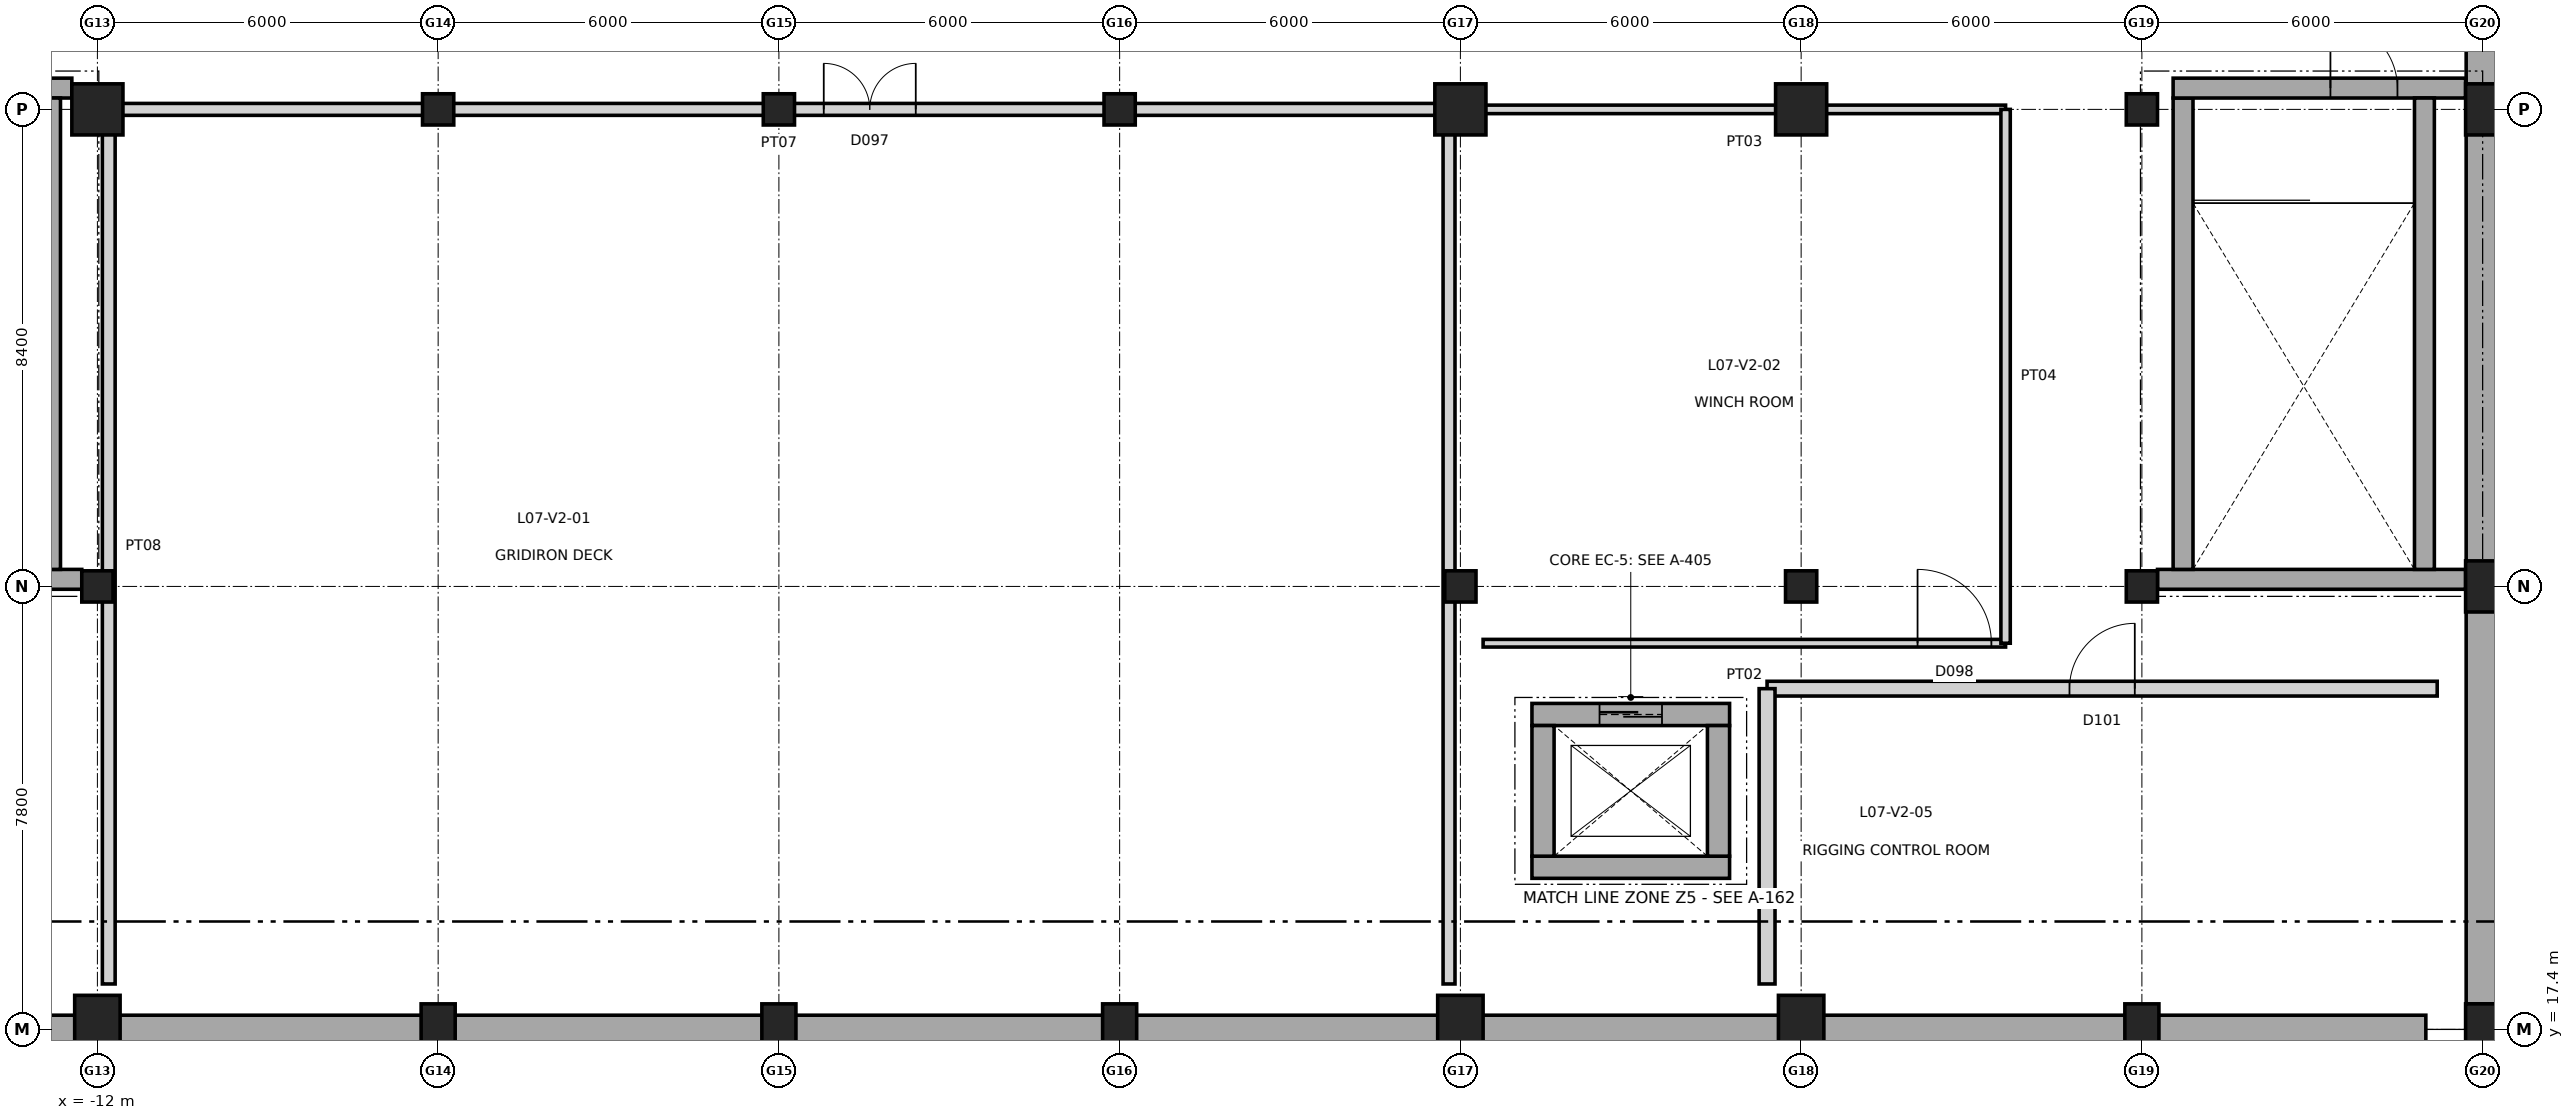
"""IFC4 building model, lengths in metres.
Left out: names, types, materials, properties, quantities, classifications, styles, units other than length and angle.
Written with IfcOpenShell. Run it as: python <this file> out.ifc"""

import sys

from ifc_helpers import new_model, si_unit, direction, frame, frame_2d, origin, origin_2d, place, context, subcontext, project, spatial, rectangle, extrude, element, fill, save


model = new_model("IFC4")
c1 = context("Model", 3, precision=1e-05, world=origin(), true_north=direction((0.0, 1.0)))
c2 = subcontext(c1, "Body", "Model", "MODEL_VIEW")
j1 = project(units=[si_unit("LENGTHUNIT", "METRE"), si_unit("PLANEANGLEUNIT", "RADIAN")], contexts=[c1])
p1 = place(None, origin())
s1 = spatial("IfcSite", under=j1, at=p1, CompositionType="ELEMENT")
p2 = place(p1, origin())
s2 = spatial("IfcBuilding", under=s1, at=p2, CompositionType="ELEMENT")
p3 = place(p2, frame((0.0, 0.0, 36.0)))
s3 = spatial("IfcBuildingStorey", under=s2, at=p3, CompositionType="ELEMENT", Elevation=36.0)
p4 = place(p3, frame((-12.0, 17.4, 0.0), z_axis=(0.0, 0.0, 1.0), x_axis=(1.0, 0.0, 0.0)))
e1 = element("IfcColumn", 1, at=p4, inside=s3, PredefinedType="COLUMN", context=c2, shape_type="SweptSolid", body=[
    extrude(rectangle(XDim=0.8, YDim=1.2, at=origin_2d()), origin(), (0.0, 0.0, 1.0), 5.4),
])
p5 = place(p3, frame((-12.0, 25.2, 0.0), z_axis=(0.0, 0.0, 1.0), x_axis=(1.0, 0.0, 0.0)))
e2 = element("IfcColumn", 2, at=p5, inside=s3, PredefinedType="COLUMN", context=c2, shape_type="SweptSolid", body=[
    extrude(rectangle(XDim=0.55, YDim=0.55, at=origin_2d()), origin(), (0.0, 0.0, 1.0), 5.4),
])
p6 = place(p3, frame((-12.0, 33.6, 0.0), z_axis=(0.0, 0.0, 1.0), x_axis=(1.0, 0.0, 0.0)))
e3 = element("IfcColumn", 3, at=p6, inside=s3, PredefinedType="COLUMN", context=c2, shape_type="SweptSolid", body=[
    extrude(rectangle(XDim=0.9, YDim=0.9, at=origin_2d()), origin(), (0.0, 0.0, 1.0), 5.4),
])
p7 = place(p3, frame((-6.0, 17.4, 0.0), z_axis=(0.0, 0.0, 1.0), x_axis=(1.0, 0.0, 0.0)))
e4 = element("IfcColumn", 4, at=p7, inside=s3, PredefinedType="COLUMN", context=c2, shape_type="SweptSolid", body=[
    extrude(rectangle(XDim=0.6, YDim=0.9, at=origin_2d()), origin(), (0.0, 0.0, 1.0), 5.4),
])
p8 = place(p3, frame((-6.0, 33.6, 0.0), z_axis=(0.0, 0.0, 1.0), x_axis=(1.0, 0.0, 0.0)))
e5 = element("IfcColumn", 5, at=p8, inside=s3, PredefinedType="COLUMN", context=c2, shape_type="SweptSolid", body=[
    extrude(rectangle(XDim=0.55, YDim=0.55, at=origin_2d()), origin(), (0.0, 0.0, 1.0), 5.4),
])
p9 = place(p3, frame((0.0, 17.4, 0.0), z_axis=(0.0, 0.0, 1.0), x_axis=(1.0, 0.0, 0.0)))
e6 = element("IfcColumn", 6, at=p9, inside=s3, PredefinedType="COLUMN", context=c2, shape_type="SweptSolid", body=[
    extrude(rectangle(XDim=0.6, YDim=0.9, at=origin_2d()), origin(), (0.0, 0.0, 1.0), 5.4),
])
p10 = place(p3, frame((0.0, 33.6, 0.0), z_axis=(0.0, 0.0, 1.0), x_axis=(1.0, 0.0, 0.0)))
e7 = element("IfcColumn", 7, at=p10, inside=s3, PredefinedType="COLUMN", context=c2, shape_type="SweptSolid", body=[
    extrude(rectangle(XDim=0.55, YDim=0.55, at=origin_2d()), origin(), (0.0, 0.0, 1.0), 5.4),
])
p11 = place(p3, frame((6.0, 17.4, 0.0), z_axis=(0.0, 0.0, 1.0), x_axis=(1.0, 0.0, 0.0)))
e8 = element("IfcColumn", 8, at=p11, inside=s3, PredefinedType="COLUMN", context=c2, shape_type="SweptSolid", body=[
    extrude(rectangle(XDim=0.6, YDim=0.9, at=origin_2d()), origin(), (0.0, 0.0, 1.0), 5.4),
])
p12 = place(p3, frame((6.0, 33.6, 0.0), z_axis=(0.0, 0.0, 1.0), x_axis=(1.0, 0.0, 0.0)))
e9 = element("IfcColumn", 9, at=p12, inside=s3, PredefinedType="COLUMN", context=c2, shape_type="SweptSolid", body=[
    extrude(rectangle(XDim=0.55, YDim=0.55, at=origin_2d()), origin(), (0.0, 0.0, 1.0), 5.4),
])
p13 = place(p3, frame((12.0, 17.4, 0.0), z_axis=(0.0, 0.0, 1.0), x_axis=(1.0, 0.0, 0.0)))
e10 = element("IfcColumn", 10, at=p13, inside=s3, PredefinedType="COLUMN", context=c2, shape_type="SweptSolid", body=[
    extrude(rectangle(XDim=0.8, YDim=1.2, at=origin_2d()), origin(), (0.0, 0.0, 1.0), 5.4),
])
p14 = place(p3, frame((12.0, 25.2, 0.0), z_axis=(0.0, 0.0, 1.0), x_axis=(1.0, 0.0, 0.0)))
e11 = element("IfcColumn", 11, at=p14, inside=s3, PredefinedType="COLUMN", context=c2, shape_type="SweptSolid", body=[
    extrude(rectangle(XDim=0.55, YDim=0.55, at=origin_2d()), origin(), (0.0, 0.0, 1.0), 5.4),
])
p15 = place(p3, frame((12.0, 33.6, 0.0), z_axis=(0.0, 0.0, 1.0), x_axis=(1.0, 0.0, 0.0)))
e12 = element("IfcColumn", 12, at=p15, inside=s3, PredefinedType="COLUMN", context=c2, shape_type="SweptSolid", body=[
    extrude(rectangle(XDim=0.9, YDim=0.9, at=origin_2d()), origin(), (0.0, 0.0, 1.0), 5.4),
])
p16 = place(p3, frame((18.0, 17.4, 0.0), z_axis=(0.0, 0.0, 1.0), x_axis=(1.0, 0.0, 0.0)))
e13 = element("IfcColumn", 13, at=p16, inside=s3, PredefinedType="COLUMN", context=c2, shape_type="SweptSolid", body=[
    extrude(rectangle(XDim=0.8, YDim=1.2, at=origin_2d()), origin(), (0.0, 0.0, 1.0), 5.4),
])
p17 = place(p3, frame((18.0, 25.2, 0.0), z_axis=(0.0, 0.0, 1.0), x_axis=(1.0, 0.0, 0.0)))
e14 = element("IfcColumn", 14, at=p17, inside=s3, PredefinedType="COLUMN", context=c2, shape_type="SweptSolid", body=[
    extrude(rectangle(XDim=0.55, YDim=0.55, at=origin_2d()), origin(), (0.0, 0.0, 1.0), 5.4),
])
p18 = place(p3, frame((18.0, 33.6, 0.0), z_axis=(0.0, 0.0, 1.0), x_axis=(1.0, 0.0, 0.0)))
e15 = element("IfcColumn", 15, at=p18, inside=s3, PredefinedType="COLUMN", context=c2, shape_type="SweptSolid", body=[
    extrude(rectangle(XDim=0.9, YDim=0.9, at=origin_2d()), origin(), (0.0, 0.0, 1.0), 5.4),
])
p19 = place(p3, frame((24.0, 17.4, 0.0), z_axis=(0.0, 0.0, 1.0), x_axis=(1.0, 0.0, 0.0)))
e16 = element("IfcColumn", 16, at=p19, inside=s3, PredefinedType="COLUMN", context=c2, shape_type="SweptSolid", body=[
    extrude(rectangle(XDim=0.6, YDim=0.9, at=origin_2d()), origin(), (0.0, 0.0, 1.0), 5.4),
])
for number, where, z_axis, x_axis in (
    (17, (24.0, 25.2, 0.0), (0.0, 0.0, 1.0), (1.0, 0.0, 0.0)),
    (18, (24.0, 33.6, 0.0), (0.0, 0.0, 1.0), (1.0, 0.0, 0.0)),
):
    element("IfcColumn", number, at=place(p3, frame(where, z_axis=z_axis, x_axis=x_axis)), inside=s3, PredefinedType="COLUMN", context=c2, shape_type="SweptSolid", body=[
        extrude(rectangle(XDim=0.55, YDim=0.55, at=origin_2d()), origin(), (0.0, 0.0, 1.0), 5.4),
    ])
for number, where, z_axis, x_axis in (
    (19, (30.0, 17.4, 0.0), (0.0, 0.0, 1.0), (1.0, 0.0, 0.0)),
    (20, (30.0, 25.2, 0.0), (0.0, 0.0, 1.0), (1.0, 0.0, 0.0)),
    (21, (30.0, 33.6, 0.0), (0.0, 0.0, 1.0), (1.0, 0.0, 0.0)),
):
    element("IfcColumn", number, at=place(p3, frame(where, z_axis=z_axis, x_axis=x_axis)), inside=s3, PredefinedType="COLUMN", context=c2, shape_type="SweptSolid", body=[
        extrude(rectangle(XDim=0.6, YDim=0.9, at=origin_2d()), origin(), (0.0, 0.0, 1.0), 5.4),
    ])
p20 = place(p3, frame((30.0, 17.85, 0.0), z_axis=(0.0, 0.0, 1.0), x_axis=(0.0, 1.0, 0.0)))
e22 = element("IfcWall", 22, at=p20, inside=s3, PredefinedType="SHEAR", context=c2, shape_type="SweptSolid", body=[
    extrude(rectangle(XDim=23.7, YDim=0.58, at=frame_2d((11.85, 0.0))), origin(), (0.0, 0.0, 1.0), 5.4),
])
p21 = place(p3, frame((-17.0, 17.4, 0.0), z_axis=(0.0, 0.0, 1.0), x_axis=(1.0, 0.0, 0.0)))
e23 = element("IfcWall", 23, at=p21, inside=s3, PredefinedType="SHEAR", context=c2, shape_type="SweptSolid", body=[
    extrude(rectangle(XDim=46.0, YDim=0.5, at=frame_2d((23.0, 0.0))), origin(), (0.0, 0.0, 1.0), 5.4),
])
p22 = place(p3, frame((-12.275, 25.325, 0.0), z_axis=(0.0, 0.0, 1.0), x_axis=(-1.0, 0.0, 0.0)))
e24 = element("IfcWall", 24, at=p22, inside=s3, PredefinedType="SHEAR", context=c2, shape_type="SweptSolid", body=[
    extrude(rectangle(XDim=5.425, YDim=0.35, at=frame_2d((2.712, 0.0))), origin(), (0.0, 0.0, 1.0), 4.645),
])
p23 = place(p3, frame((-17.6, 33.975, 0.0), z_axis=(0.0, 0.0, 1.0), x_axis=(1.0, 0.0, 0.0)))
e25 = element("IfcWall", 25, at=p23, inside=s3, PredefinedType="SHEAR", context=c2, shape_type="SweptSolid", body=[
    extrude(rectangle(XDim=5.15, YDim=0.35, at=frame_2d((2.575, 0.0))), origin(), (0.0, 0.0, 1.0), 4.645),
])
p24 = place(p23, frame((3.12, 0.0, 0.0)))
e26 = element("IfcOpeningElement", 26, at=p24, cuts=e25, PredefinedType="OPENING", context=c2, shape_type="SweptSolid", body=[
    extrude(rectangle(XDim=1.18, YDim=2.15, at=frame_2d((0.59, 1.075))), frame((0.0, 0.185, 0.0), z_axis=(0.0, -1.0, 0.0), x_axis=(1.0, 0.0, 0.0)), (0.0, 0.0, 1.0), 0.37),
])
p25 = place(p3, frame((-12.825, 33.8, 0.0), z_axis=(0.0, 0.0, 1.0), x_axis=(0.0, -1.0, 0.0)))
e27 = element("IfcWall", 27, at=p25, inside=s3, PredefinedType="SHEAR", context=c2, shape_type="SweptSolid", body=[
    extrude(rectangle(XDim=8.3, YDim=0.35, at=frame_2d((4.15, 0.0))), origin(), (0.0, 0.0, 1.0), 4.645),
])
p26 = place(p3, frame((29.7, 25.325, 0.0), z_axis=(0.0, 0.0, 1.0), x_axis=(-1.0, 0.0, 0.0)))
e28 = element("IfcWall", 28, at=p26, inside=s3, PredefinedType="SHEAR", context=c2, shape_type="SweptSolid", body=[
    extrude(rectangle(XDim=5.425, YDim=0.35, at=frame_2d((2.712, 0.0))), origin(), (0.0, 0.0, 1.0), 4.645),
])
p27 = place(p3, frame((24.725, 25.5, 0.0), z_axis=(0.0, 0.0, 1.0), x_axis=(0.0, 1.0, 0.0)))
e29 = element("IfcWall", 29, at=p27, inside=s3, PredefinedType="SHEAR", context=c2, shape_type="SweptSolid", body=[
    extrude(rectangle(XDim=8.3, YDim=0.35, at=frame_2d((4.15, 0.0))), origin(), (0.0, 0.0, 1.0), 4.645),
])
p28 = place(p3, frame((24.55, 33.975, 0.0), z_axis=(0.0, 0.0, 1.0), x_axis=(1.0, 0.0, 0.0)))
e30 = element("IfcWall", 30, at=p28, inside=s3, PredefinedType="SHEAR", context=c2, shape_type="SweptSolid", body=[
    extrude(rectangle(XDim=5.15, YDim=0.35, at=frame_2d((2.575, 0.0))), origin(), (0.0, 0.0, 1.0), 4.645),
])
p29 = place(p28, frame((2.77, 0.0, 0.0)))
e31 = element("IfcOpeningElement", 31, at=p29, cuts=e30, PredefinedType="OPENING", context=c2, shape_type="SweptSolid", body=[
    extrude(rectangle(XDim=1.18, YDim=2.15, at=frame_2d((0.59, 1.075))), frame((0.0, 0.185, 0.0), z_axis=(0.0, -1.0, 0.0), x_axis=(1.0, 0.0, 0.0)), (0.0, 0.0, 1.0), 0.37),
])
p30 = place(p3, frame((28.975, 33.8, 0.0), z_axis=(0.0, 0.0, 1.0), x_axis=(0.0, -1.0, 0.0)))
e32 = element("IfcWall", 32, at=p30, inside=s3, PredefinedType="SHEAR", context=c2, shape_type="SweptSolid", body=[
    extrude(rectangle(XDim=8.3, YDim=0.35, at=frame_2d((4.15, 0.0))), origin(), (0.0, 0.0, 1.0), 4.645),
])
p31 = place(p3, frame((16.74, 20.255, 0.0), z_axis=(0.0, 0.0, 1.0), x_axis=(-1.0, 0.0, 0.0)))
e33 = element("IfcWall", 33, at=p31, inside=s3, PredefinedType="SHEAR", context=c2, shape_type="SweptSolid", body=[
    extrude(rectangle(XDim=3.48, YDim=0.39, at=frame_2d((1.74, 0.0))), origin(), (0.0, 0.0, 1.0), 4.645),
])
p32 = place(p3, frame((13.26, 22.945, 0.0), z_axis=(0.0, 0.0, 1.0), x_axis=(1.0, 0.0, 0.0)))
e34 = element("IfcWall", 34, at=p32, inside=s3, PredefinedType="SHEAR", context=c2, shape_type="SweptSolid", body=[
    extrude(rectangle(XDim=3.48, YDim=0.39, at=frame_2d((1.74, 0.0))), origin(), (0.0, 0.0, 1.0), 4.645),
])
p33 = place(p32, frame((1.19, 0.0, 0.0)))
e35 = element("IfcOpeningElement", 35, at=p33, cuts=e34, PredefinedType="OPENING", context=c2, shape_type="SweptSolid", body=[
    extrude(rectangle(XDim=1.1, YDim=2.15, at=frame_2d((0.55, 1.075))), frame((0.0, 0.205, 0.0), z_axis=(0.0, -1.0, 0.0), x_axis=(1.0, 0.0, 0.0)), (0.0, 0.0, 1.0), 0.41),
])
for number, where, z_axis, x_axis in (
    (36, (13.455, 20.45, 0.0), (0.0, 0.0, 1.0), (0.0, 1.0, 0.0)),
    (37, (16.545, 22.75, 0.0), (0.0, 0.0, 1.0), (0.0, -1.0, 0.0)),
):
    element("IfcWall", number, at=place(p3, frame(where, z_axis=z_axis, x_axis=x_axis)), inside=s3, PredefinedType="SHEAR", context=c2, shape_type="SweptSolid", body=[
        extrude(rectangle(XDim=2.3, YDim=0.39, at=frame_2d((1.15, 0.0))), origin(), (0.0, 0.0, 1.0), 4.645),
    ])
p34 = place(p3, frame((-11.8, 33.6, 0.0), z_axis=(0.0, 0.0, 1.0), x_axis=(1.0, 0.0, 0.0)))
e38 = element("IfcWall", 38, at=p34, inside=s3, PredefinedType="PARTITIONING", context=c2, shape_type="SweptSolid", body=[
    extrude(rectangle(XDim=23.6, YDim=0.21, at=frame_2d((11.8, 0.0))), origin(), (0.0, 0.0, 1.0), 5.02),
])
p35 = place(p34, frame((12.59, 0.0, 0.0)))
e39 = element("IfcOpeningElement", 39, at=p35, cuts=e38, PredefinedType="OPENING", context=c2, shape_type="SweptSolid", body=[
    extrude(rectangle(XDim=1.62, YDim=2.2, at=frame_2d((0.81, 1.1))), frame((0.0, 0.115, 0.0), z_axis=(0.0, -1.0, 0.0), x_axis=(1.0, 0.0, 0.0)), (0.0, 0.0, 1.0), 0.23),
])
p36 = place(p3, frame((-11.8, 18.2, 0.0), z_axis=(0.0, 0.0, 1.0), x_axis=(0.0, 1.0, 0.0)))
e40 = element("IfcWall", 40, at=p36, inside=s3, PredefinedType="PARTITIONING", context=c2, shape_type="SweptSolid", body=[
    extrude(rectangle(XDim=15.4, YDim=0.225, at=frame_2d((7.7, 0.0))), origin(), (0.0, 0.0, 1.0), 4.33),
])
p37 = place(p3, frame((11.8, 18.2, 0.0), z_axis=(0.0, 0.0, 1.0), x_axis=(0.0, 1.0, 0.0)))
e41 = element("IfcWall", 41, at=p37, inside=s3, PredefinedType="PARTITIONING", context=c2, shape_type="SweptSolid", body=[
    extrude(rectangle(XDim=15.4, YDim=0.21, at=frame_2d((7.7, 0.0))), origin(), (0.0, 0.0, 1.0), 4.33),
])
p38 = place(p3, frame((12.4, 24.2, 0.0), z_axis=(0.0, 0.0, 1.0), x_axis=(1.0, 0.0, 0.0)))
e42 = element("IfcWall", 42, at=p38, inside=s3, PredefinedType="PARTITIONING", context=c2, shape_type="SweptSolid", body=[
    extrude(rectangle(XDim=9.2, YDim=0.135, at=frame_2d((4.6, 0.0))), origin(), (0.0, 0.0, 1.0), 5.02),
])
p39 = place(p38, frame((7.65, 0.0, 0.0)))
e43 = element("IfcOpeningElement", 43, at=p39, cuts=e42, PredefinedType="OPENING", context=c2, shape_type="SweptSolid", body=[
    extrude(rectangle(XDim=1.3, YDim=2.25, at=frame_2d((0.65, 1.125))), frame((0.0, 0.077, 0.0), z_axis=(0.0, -1.0, 0.0), x_axis=(1.0, 0.0, 0.0)), (0.0, 0.0, 1.0), 0.155),
])
p40 = place(p3, frame((12.4, 33.6, 0.0), z_axis=(0.0, 0.0, 1.0), x_axis=(1.0, 0.0, 0.0)))
e44 = element("IfcWall", 44, at=p40, inside=s3, PredefinedType="PARTITIONING", context=c2, shape_type="SweptSolid", body=[
    extrude(rectangle(XDim=9.2, YDim=0.15, at=frame_2d((4.6, 0.0))), origin(), (0.0, 0.0, 1.0), 5.02),
])
p41 = place(p3, frame((21.6, 24.2, 0.0), z_axis=(0.0, 0.0, 1.0), x_axis=(0.0, 1.0, 0.0)))
e45 = element("IfcWall", 45, at=p41, inside=s3, PredefinedType="PARTITIONING", context=c2, shape_type="SweptSolid", body=[
    extrude(rectangle(XDim=9.4, YDim=0.165, at=frame_2d((4.7, 0.0))), origin(), (0.0, 0.0, 1.0), 5.02),
])
p42 = place(p3, frame((17.4, 23.4, 0.0), z_axis=(0.0, 0.0, 1.0), x_axis=(1.0, 0.0, 0.0)))
e46 = element("IfcWall", 46, at=p42, inside=s3, PredefinedType="PARTITIONING", context=c2, shape_type="SweptSolid", body=[
    extrude(rectangle(XDim=11.8, YDim=0.26, at=frame_2d((5.9, 0.0))), origin(), (0.0, 0.0, 1.0), 5.02),
])
p43 = place(p42, frame((5.325, 0.0, 0.0)))
e47 = element("IfcOpeningElement", 47, at=p43, cuts=e46, PredefinedType="OPENING", context=c2, shape_type="SweptSolid", body=[
    extrude(rectangle(XDim=1.15, YDim=2.3, at=frame_2d((0.575, 1.15))), frame((0.0, 0.14, 0.0), z_axis=(0.0, -1.0, 0.0), x_axis=(1.0, 0.0, 0.0)), (0.0, 0.0, 1.0), 0.28),
])
p44 = place(p3, frame((17.4, 18.2, 0.0), z_axis=(0.0, 0.0, 1.0), x_axis=(0.0, 1.0, 0.0)))
e48 = element("IfcWall", 48, at=p44, inside=s3, PredefinedType="PARTITIONING", context=c2, shape_type="SweptSolid", body=[
    extrude(rectangle(XDim=5.2, YDim=0.28, at=frame_2d((2.6, 0.0))), origin(), (0.0, 0.0, 1.0), 5.02),
])
p45 = place(p29, origin())
e49 = element("IfcDoor", 49, at=p45, inside=s3, OperationType="SINGLE_SWING_LEFT", PredefinedType="DOOR", context=c2, shape_type="SweptSolid", body=[
    extrude(rectangle(XDim=1.18, YDim=2.15, at=frame_2d((0.59, 1.075))), frame((0.0, 0.025, 0.0), z_axis=(0.0, -1.0, 0.0), x_axis=(1.0, 0.0, 0.0)), (0.0, 0.0, 1.0), 0.05),
])
fill(e31, e49)
p46 = place(p33, origin())
e50 = element("IfcDoor", 50, at=p46, inside=s3, OperationType="SLIDING_TO_LEFT", PredefinedType="DOOR", context=c2, shape_type="SweptSolid", body=[
    extrude(rectangle(XDim=1.1, YDim=2.15, at=frame_2d((0.55, 1.075))), frame((0.0, 0.025, 0.0), z_axis=(0.0, -1.0, 0.0), x_axis=(1.0, 0.0, 0.0)), (0.0, 0.0, 1.0), 0.05),
])
fill(e35, e50)
p47 = place(p35, origin())
e51 = element("IfcDoor", 51, at=p47, inside=s3, OperationType="DOUBLE_DOOR_SINGLE_SWING", PredefinedType="DOOR", context=c2, shape_type="SweptSolid", body=[
    extrude(rectangle(XDim=1.62, YDim=2.2, at=frame_2d((0.81, 1.1))), frame((0.0, 0.025, 0.0), z_axis=(0.0, -1.0, 0.0), x_axis=(1.0, 0.0, 0.0)), (0.0, 0.0, 1.0), 0.05),
])
fill(e39, e51)
p48 = place(p39, origin())
e52 = element("IfcDoor", 52, at=p48, inside=s3, OperationType="SINGLE_SWING_LEFT", PredefinedType="DOOR", context=c2, shape_type="SweptSolid", body=[
    extrude(rectangle(XDim=1.3, YDim=2.25, at=frame_2d((0.65, 1.125))), frame((0.0, 0.025, 0.0), z_axis=(0.0, -1.0, 0.0), x_axis=(1.0, 0.0, 0.0)), (0.0, 0.0, 1.0), 0.05),
])
fill(e43, e52)
p49 = place(p43, origin())
e53 = element("IfcDoor", 53, at=p49, inside=s3, OperationType="SINGLE_SWING_RIGHT", PredefinedType="DOOR", context=c2, shape_type="SweptSolid", body=[
    extrude(rectangle(XDim=1.15, YDim=2.3, at=frame_2d((0.575, 1.15))), frame((0.0, 0.025, 0.0), z_axis=(0.0, -1.0, 0.0), x_axis=(1.0, 0.0, 0.0)), (0.0, 0.0, 1.0), 0.05),
])
fill(e47, e53)
save(model, sys.argv[1])
